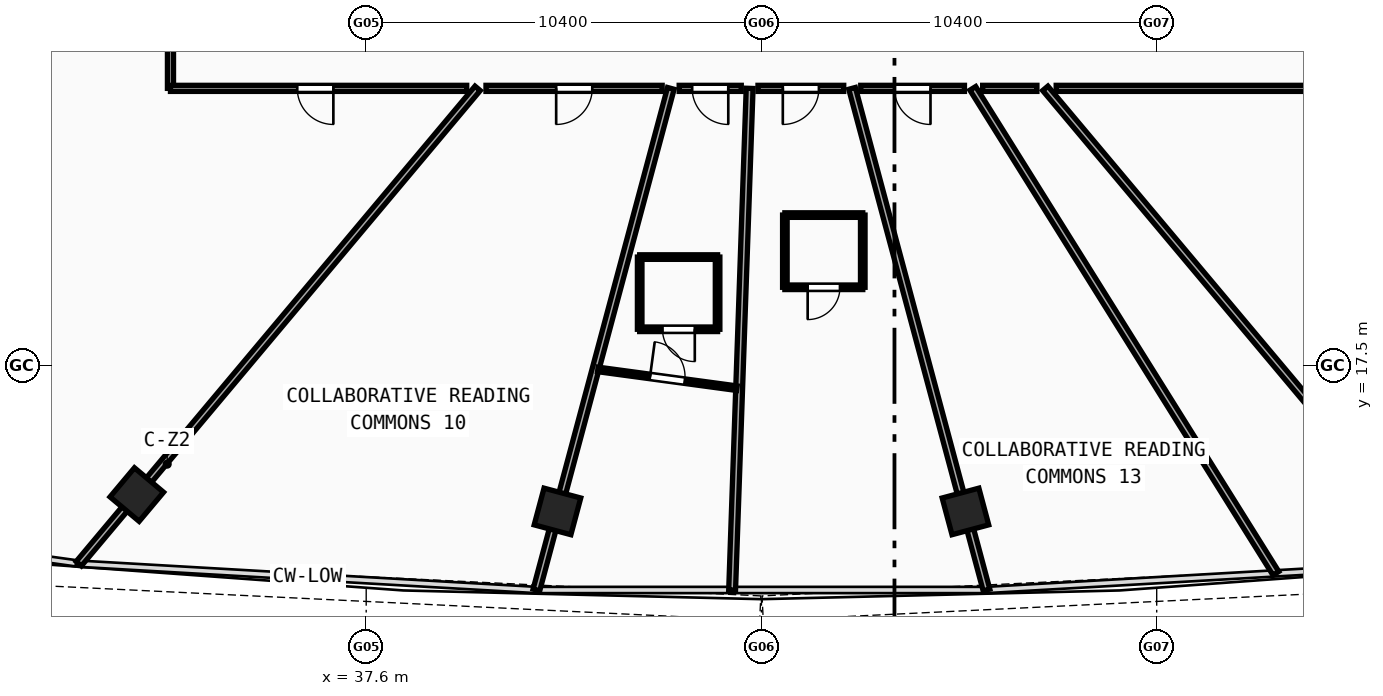
"""IFC4 building model, lengths in metres.
Left out: names, types, materials, properties, quantities, classifications, styles, units other than length and angle.
Written with IfcOpenShell. Run it as: python <this file> out.ifc"""

import sys

from ifc_helpers import new_model, si_unit, direction, frame, frame_2d, origin, origin_with_axes, origin_2d, place, context, subcontext, project, spatial, rectangle, hollow_rectangle, extrude, source, transform, mapped, element, fill, save


model = new_model("IFC4")
c1 = context("Model", 3, precision=1e-05, world=origin(), true_north=direction((0.0, 1.0)))
c2 = subcontext(c1, "Body", "Model", "MODEL_VIEW")
j1 = project(units=[si_unit("LENGTHUNIT", "METRE"), si_unit("PLANEANGLEUNIT", "RADIAN")], contexts=[c1])
p1 = place(None, origin())
s1 = spatial("IfcSite", under=j1, at=p1, CompositionType="ELEMENT")
p2 = place(p1, origin())
s2 = spatial("IfcBuilding", under=s1, at=p2, CompositionType="ELEMENT")
p3 = place(p2, frame((0.0, 0.0, 84.98)))
s3 = spatial("IfcBuildingStorey", under=s2, at=p3, CompositionType="ELEMENT", Elevation=84.98)
m1 = source(origin(), c2, "Body", "SweptSolid", [
    extrude(hollow_rectangle(XDim=1.0, YDim=1.0, WallThickness=0.042, at=origin_2d()), origin(), (0.0, 0.0, 1.0), 3.8),
])
for number, where, z_axis, x_axis in (
    (1, (31.564, 14.112, -0.26), (0.0, 0.0, 1.0), (0.766, -0.643, 0.0)),
    (2, (42.633, 13.668, -0.26), (0.0, 0.0, 1.0), (0.966, -0.259, 0.0)),
    (3, (53.367, 13.668, -0.26), (0.0, 0.0, 1.0), (0.966, 0.259, 0.0)),
):
    element("IfcColumn", number, at=place(p3, frame(where, z_axis=z_axis, x_axis=x_axis)), inside=s3, PredefinedType="COLUMN", context=c2, shape_type="MappedRepresentation", body=[
        mapped(m1, transform((0.0, 0.0, 0.0), scale=1.0)),
    ])
p4 = place(p3, frame((40.532, 24.8, 0.0), z_axis=(0.0, 0.0, 1.0), x_axis=(-0.642790086939, -0.76604236445, 0.0)))
e4 = element("IfcWall", 4, at=p4, inside=s3, PredefinedType="PARTITIONING", context=c2, shape_type="SweptSolid", body=[
    extrude(rectangle(XDim=16.326, YDim=0.18, at=frame_2d((8.163, 0.0))), origin(), (0.0, 0.0, 1.0), 2.84),
])
p5 = place(p3, frame((45.615, 24.8, 0.0), z_axis=(0.0, 0.0, 1.0), x_axis=(-0.25881675816, -0.965926439071, 0.0)))
e5 = element("IfcWall", 5, at=p5, inside=s3, PredefinedType="PARTITIONING", context=c2, shape_type="SweptSolid", body=[
    extrude(rectangle(XDim=13.665, YDim=0.18, at=frame_2d((6.832, 0.0))), origin(), (0.0, 0.0, 1.0), 2.84),
])
p6 = place(p3, frame((47.689, 24.8, 0.0), z_axis=(0.0, 0.0, 1.0), x_axis=(-0.034900944933, -0.999390776445, 0.0)))
e6 = element("IfcWall", 6, at=p6, inside=s3, PredefinedType="PARTITIONING", context=c2, shape_type="SweptSolid", body=[
    extrude(rectangle(XDim=13.207, YDim=0.18, at=frame_2d((6.604, 0.0))), origin(), (0.0, 0.0, 1.0), 2.84),
])
p7 = place(p3, frame((50.385, 24.8, 0.0), z_axis=(0.0, 0.0, 1.0), x_axis=(0.25881675816, -0.965926439071, 0.0)))
e7 = element("IfcWall", 7, at=p7, inside=s3, PredefinedType="PARTITIONING", context=c2, shape_type="SweptSolid", body=[
    extrude(rectangle(XDim=13.665, YDim=0.18, at=frame_2d((6.832, 0.0))), origin(), (0.0, 0.0, 1.0), 2.84),
])
p8 = place(p3, frame((53.561, 24.8, 0.0), z_axis=(0.0, 0.0, 1.0), x_axis=(0.529927477017, -0.848042964184, 0.0)))
e8 = element("IfcWall", 8, at=p8, inside=s3, PredefinedType="PARTITIONING", context=c2, shape_type="SweptSolid", body=[
    extrude(rectangle(XDim=15.048, YDim=0.18, at=frame_2d((7.524, 0.0))), origin(), (0.0, 0.0, 1.0), 2.84),
])
p9 = place(p3, frame((55.468, 24.8, 0.0), z_axis=(0.0, 0.0, 1.0), x_axis=(0.642790086939, -0.76604236445, 0.0)))
e9 = element("IfcWall", 9, at=p9, inside=s3, PredefinedType="PARTITIONING", context=c2, shape_type="SweptSolid", body=[
    extrude(rectangle(XDim=16.326, YDim=0.18, at=frame_2d((8.163, 0.0))), origin(), (0.0, 0.0, 1.0), 2.84),
])
p10 = place(p3, frame((32.45, 24.8, 0.0), z_axis=(0.0, 0.0, 1.0), x_axis=(0.0, 1.0, 0.0)))
e10 = element("IfcWall", 10, at=p10, inside=s3, PredefinedType="PARTITIONING", context=c2, shape_type="SweptSolid", body=[
    extrude(rectangle(XDim=5.935, YDim=0.16, at=frame_2d((2.967, 0.0))), origin(), (0.0, 0.0, 1.0), 3.14),
])
p11 = place(p3, frame((64.2, 24.8, 0.0), z_axis=(0.0, 0.0, 1.0), x_axis=(-1.0, 0.0, 0.0)))
e11 = element("IfcWall", 11, at=p11, inside=s3, PredefinedType="PARTITIONING", context=c2, shape_type="SweptSolid", body=[
    extrude(rectangle(XDim=8.445, YDim=0.16, at=frame_2d((4.222, 0.0))), origin(), (0.0, 0.0, 1.0), 3.14),
])
p12 = place(p3, frame((55.248, 24.8, 0.0), z_axis=(0.0, 0.0, 1.0), x_axis=(-1.0, 0.0, 0.0)))
e12 = element("IfcWall", 12, at=p12, inside=s3, PredefinedType="PARTITIONING", context=c2, shape_type="SweptSolid", body=[
    extrude(rectangle(XDim=1.427, YDim=0.16, at=frame_2d((0.714, 0.0))), origin(), (0.0, 0.0, 1.0), 2.84),
])
p13 = place(p3, frame((53.342, 24.8, 0.0), z_axis=(0.0, 0.0, 1.0), x_axis=(-1.0, 0.0, 0.0)))
e13 = element("IfcWall", 13, at=p13, inside=s3, PredefinedType="PARTITIONING", context=c2, shape_type="SweptSolid", body=[
    extrude(rectangle(XDim=2.729, YDim=0.16, at=frame_2d((1.365, 0.0))), origin(), (0.0, 0.0, 1.0), 3.54),
])
p14 = place(p13, frame((0.894, 0.0, 0.0)))
e14 = element("IfcOpeningElement", 14, at=p14, cuts=e13, PredefinedType="OPENING", context=c2, shape_type="SweptSolid", body=[
    extrude(rectangle(XDim=0.95, YDim=2.1, at=frame_2d((0.475, 1.05))), frame((0.0, 0.09, 0.0), z_axis=(0.0, -1.0, 0.0), x_axis=(1.0, 0.0, 0.0)), (0.0, 0.0, 1.0), 0.18),
])
p15 = place(p3, frame((50.165, 24.8, 0.0), z_axis=(0.0, 0.0, 1.0), x_axis=(-1.0, 0.0, 0.0)))
e15 = element("IfcWall", 15, at=p15, inside=s3, PredefinedType="PARTITIONING", context=c2, shape_type="SweptSolid", body=[
    extrude(rectangle(XDim=2.256, YDim=0.16, at=frame_2d((1.128, 0.0))), origin(), (0.0, 0.0, 1.0), 3.54),
])
p16 = place(p15, frame((0.653, 0.0, 0.0)))
e16 = element("IfcOpeningElement", 16, at=p16, cuts=e15, PredefinedType="OPENING", context=c2, shape_type="SweptSolid", body=[
    extrude(rectangle(XDim=0.95, YDim=2.1, at=frame_2d((0.475, 1.05))), frame((0.0, 0.09, 0.0), z_axis=(0.0, -1.0, 0.0), x_axis=(1.0, 0.0, 0.0)), (0.0, 0.0, 1.0), 0.18),
])
p17 = place(p3, frame((47.469, 24.8, 0.0), z_axis=(0.0, 0.0, 1.0), x_axis=(-1.0, 0.0, 0.0)))
e17 = element("IfcWall", 17, at=p17, inside=s3, PredefinedType="PARTITIONING", context=c2, shape_type="SweptSolid", body=[
    extrude(rectangle(XDim=1.634, YDim=0.16, at=frame_2d((0.817, 0.0))), origin(), (0.0, 0.0, 1.0), 3.54),
])
p18 = place(p17, frame((0.342, 0.0, 0.0)))
e18 = element("IfcOpeningElement", 18, at=p18, cuts=e17, PredefinedType="OPENING", context=c2, shape_type="SweptSolid", body=[
    extrude(rectangle(XDim=0.95, YDim=2.1, at=frame_2d((0.475, 1.05))), frame((0.0, 0.09, 0.0), z_axis=(0.0, -1.0, 0.0), x_axis=(1.0, 0.0, 0.0)), (0.0, 0.0, 1.0), 0.18),
])
p19 = place(p3, frame((45.387, 24.8, 0.0), z_axis=(0.0, 0.0, 1.0), x_axis=(-1.0, 0.0, 0.0)))
e19 = element("IfcWall", 19, at=p19, inside=s3, PredefinedType="PARTITIONING", context=c2, shape_type="SweptSolid", body=[
    extrude(rectangle(XDim=4.635, YDim=0.16, at=frame_2d((2.318, 0.0))), origin(), (0.0, 0.0, 1.0), 2.84),
])
p20 = place(p19, frame((1.839, 0.0, 0.0)))
e20 = element("IfcOpeningElement", 20, at=p20, cuts=e19, PredefinedType="OPENING", context=c2, shape_type="SweptSolid", body=[
    extrude(rectangle(XDim=0.95, YDim=2.1, at=frame_2d((0.475, 1.05))), frame((0.0, 0.09, 0.0), z_axis=(0.0, -1.0, 0.0), x_axis=(1.0, 0.0, 0.0)), (0.0, 0.0, 1.0), 0.18),
])
p21 = place(p3, frame((40.245, 24.8, 0.0), z_axis=(0.0, 0.0, 1.0), x_axis=(-1.0, 0.0, 0.0)))
e21 = element("IfcWall", 21, at=p21, inside=s3, PredefinedType="PARTITIONING", context=c2, shape_type="SweptSolid", body=[
    extrude(rectangle(XDim=7.795, YDim=0.16, at=frame_2d((3.897, 0.0))), origin(), (0.0, 0.0, 1.0), 3.14),
])
p22 = place(p21, frame((3.509, 0.0, 0.0)))
e22 = element("IfcOpeningElement", 22, at=p22, cuts=e21, PredefinedType="OPENING", context=c2, shape_type="SweptSolid", body=[
    extrude(rectangle(XDim=0.95, YDim=2.1, at=frame_2d((0.475, 1.05))), frame((0.0, 0.09, 0.0), z_axis=(0.0, -1.0, 0.0), x_axis=(1.0, 0.0, 0.0)), (0.0, 0.0, 1.0), 0.18),
])
p23 = place(p3, frame((44.796, 18.461, 0.0), z_axis=(0.0, 0.0, 1.0), x_axis=(1.0, 0.0, 0.0)))
e23 = element("IfcWall", 23, at=p23, inside=s3, PredefinedType="PARTITIONING", context=c2, shape_type="SweptSolid", body=[
    extrude(rectangle(XDim=2.05, YDim=0.12, at=frame_2d((1.025, 0.0))), origin(), (0.0, 0.0, 1.0), 3.54),
])
p24 = place(p23, frame((0.6, 0.0, 0.0)))
e24 = element("IfcOpeningElement", 24, at=p24, cuts=e23, PredefinedType="OPENING", context=c2, shape_type="SweptSolid", body=[
    extrude(rectangle(XDim=0.85, YDim=2.1, at=frame_2d((0.425, 1.05))), frame((0.0, 0.07, 0.0), z_axis=(0.0, -1.0, 0.0), x_axis=(1.0, 0.0, 0.0)), (0.0, 0.0, 1.0), 0.14),
])
p25 = place(p3, frame((46.846, 18.461, 0.0), z_axis=(0.0, 0.0, 1.0), x_axis=(0.0, 1.0, 0.0)))
e25 = element("IfcWall", 25, at=p25, inside=s3, PredefinedType="PARTITIONING", context=c2, shape_type="SweptSolid", body=[
    extrude(rectangle(XDim=1.9, YDim=0.12, at=frame_2d((0.95, 0.0))), origin(), (0.0, 0.0, 1.0), 3.54),
])
p26 = place(p3, frame((46.846, 20.361, 0.0), z_axis=(0.0, 0.0, 1.0), x_axis=(-1.0, 0.0, 0.0)))
e26 = element("IfcWall", 26, at=p26, inside=s3, PredefinedType="PARTITIONING", context=c2, shape_type="SweptSolid", body=[
    extrude(rectangle(XDim=2.05, YDim=0.12, at=frame_2d((1.025, 0.0))), origin(), (0.0, 0.0, 1.0), 3.54),
])
p27 = place(p3, frame((44.796, 20.361, 0.0), z_axis=(0.0, 0.0, 1.0), x_axis=(0.0, -1.0, 0.0)))
e27 = element("IfcWall", 27, at=p27, inside=s3, PredefinedType="PARTITIONING", context=c2, shape_type="SweptSolid", body=[
    extrude(rectangle(XDim=1.9, YDim=0.12, at=frame_2d((0.95, 0.0))), origin(), (0.0, 0.0, 1.0), 3.54),
])
p28 = place(p3, frame((43.696, 17.405, 0.0), z_axis=(0.0, 0.0, 1.0), x_axis=(0.99099005791, -0.133935451329, 0.0)))
e28 = element("IfcWall", 28, at=p28, inside=s3, PredefinedType="PARTITIONING", context=c2, shape_type="SweptSolid", body=[
    extrude(rectangle(XDim=3.691, YDim=0.12, at=frame_2d((1.846, 0.0))), origin(), (0.0, 0.0, 1.0), 2.84),
])
p29 = place(p28, frame((1.385, 0.0, 0.0)))
e29 = element("IfcOpeningElement", 29, at=p29, cuts=e28, PredefinedType="OPENING", context=c2, shape_type="SweptSolid", body=[
    extrude(rectangle(XDim=0.92, YDim=2.1, at=frame_2d((0.46, 1.05))), frame((0.0, 0.07, 0.0), z_axis=(0.0, -1.0, 0.0), x_axis=(1.0, 0.0, 0.0)), (0.0, 0.0, 1.0), 0.14),
])
p30 = place(p3, frame((48.616, 19.566, 0.0), z_axis=(0.0, 0.0, 1.0), x_axis=(1.0, 0.0, 0.0)))
e30 = element("IfcWall", 30, at=p30, inside=s3, PredefinedType="PARTITIONING", context=c2, shape_type="SweptSolid", body=[
    extrude(rectangle(XDim=2.05, YDim=0.12, at=frame_2d((1.025, 0.0))), origin(), (0.0, 0.0, 1.0), 3.54),
])
p31 = place(p30, frame((0.6, 0.0, 0.0)))
e31 = element("IfcOpeningElement", 31, at=p31, cuts=e30, PredefinedType="OPENING", context=c2, shape_type="SweptSolid", body=[
    extrude(rectangle(XDim=0.85, YDim=2.1, at=frame_2d((0.425, 1.05))), frame((0.0, 0.07, 0.0), z_axis=(0.0, -1.0, 0.0), x_axis=(1.0, 0.0, 0.0)), (0.0, 0.0, 1.0), 0.14),
])
p32 = place(p3, frame((50.666, 19.566, 0.0), z_axis=(0.0, 0.0, 1.0), x_axis=(0.0, 1.0, 0.0)))
e32 = element("IfcWall", 32, at=p32, inside=s3, PredefinedType="PARTITIONING", context=c2, shape_type="SweptSolid", body=[
    extrude(rectangle(XDim=1.9, YDim=0.12, at=frame_2d((0.95, 0.0))), origin(), (0.0, 0.0, 1.0), 3.54),
])
p33 = place(p3, frame((50.666, 21.466, 0.0), z_axis=(0.0, 0.0, 1.0), x_axis=(-1.0, 0.0, 0.0)))
e33 = element("IfcWall", 33, at=p33, inside=s3, PredefinedType="PARTITIONING", context=c2, shape_type="SweptSolid", body=[
    extrude(rectangle(XDim=2.05, YDim=0.12, at=frame_2d((1.025, 0.0))), origin(), (0.0, 0.0, 1.0), 3.54),
])
p34 = place(p3, frame((48.616, 21.466, 0.0), z_axis=(0.0, 0.0, 1.0), x_axis=(0.0, -1.0, 0.0)))
e34 = element("IfcWall", 34, at=p34, inside=s3, PredefinedType="PARTITIONING", context=c2, shape_type="SweptSolid", body=[
    extrude(rectangle(XDim=1.9, YDim=0.12, at=frame_2d((0.95, 0.0))), origin(), (0.0, 0.0, 1.0), 3.54),
])
m2 = source(origin(), c2, "Body", "SweptSolid", [
    extrude(rectangle(XDim=0.95, YDim=2.1, at=frame_2d((0.475, 1.05))), frame((0.0, 0.025, 0.0), z_axis=(0.0, -1.0, 0.0), x_axis=(1.0, 0.0, 0.0)), (0.0, 0.0, 1.0), 0.05),
])
p35 = place(p22, origin_with_axes())
e35 = element("IfcDoor", 35, at=p35, inside=s3, OperationType="SINGLE_SWING_LEFT", PredefinedType="DOOR", context=c2, shape_type="MappedRepresentation", body=[
    mapped(m2, transform((0.0, 0.0, 0.0), scale=1.0)),
])
fill(e22, e35)
p36 = place(p20, origin_with_axes())
e36 = element("IfcDoor", 36, at=p36, inside=s3, OperationType="SINGLE_SWING_RIGHT", PredefinedType="DOOR", context=c2, shape_type="MappedRepresentation", body=[
    mapped(m2, transform((0.0, 0.0, 0.0), scale=1.0)),
])
fill(e20, e36)
p37 = place(p18, origin_with_axes())
e37 = element("IfcDoor", 37, at=p37, inside=s3, OperationType="SINGLE_SWING_LEFT", PredefinedType="DOOR", context=c2, shape_type="MappedRepresentation", body=[
    mapped(m2, transform((0.0, 0.0, 0.0), scale=1.0)),
])
fill(e18, e37)
m3 = source(origin(), c2, "Body", "SweptSolid", [
    extrude(rectangle(XDim=0.85, YDim=2.1, at=frame_2d((0.425, 1.05))), frame((0.0, 0.025, 0.0), z_axis=(0.0, -1.0, 0.0), x_axis=(1.0, 0.0, 0.0)), (0.0, 0.0, 1.0), 0.05),
])
p38 = place(p24, frame((0.85, 0.0, 0.0), z_axis=(0.0, 0.0, 1.0), x_axis=(-1.0, 0.0, 0.0)))
e38 = element("IfcDoor", 38, at=p38, inside=s3, OperationType="SINGLE_SWING_LEFT", PredefinedType="DOOR", context=c2, shape_type="MappedRepresentation", body=[
    mapped(m3, transform((0.0, 0.0, 0.0), scale=1.0)),
])
fill(e24, e38)
m4 = source(origin(), c2, "Body", "SweptSolid", [
    extrude(rectangle(XDim=0.92, YDim=2.1, at=frame_2d((0.46, 1.05))), frame((0.0, 0.025, 0.0), z_axis=(0.0, -1.0, 0.0), x_axis=(1.0, 0.0, 0.0)), (0.0, 0.0, 1.0), 0.05),
])
p39 = place(p29, origin_with_axes())
e39 = element("IfcDoor", 39, at=p39, inside=s3, OperationType="SINGLE_SWING_LEFT", PredefinedType="DOOR", context=c2, shape_type="MappedRepresentation", body=[
    mapped(m4, transform((0.0, 0.0, 0.0), scale=1.0)),
])
fill(e29, e39)
p40 = place(p16, origin_with_axes())
e40 = element("IfcDoor", 40, at=p40, inside=s3, OperationType="SINGLE_SWING_RIGHT", PredefinedType="DOOR", context=c2, shape_type="MappedRepresentation", body=[
    mapped(m2, transform((0.0, 0.0, 0.0), scale=1.0)),
])
fill(e16, e40)
p41 = place(p31, frame((0.85, 0.0, 0.0), z_axis=(0.0, 0.0, 1.0), x_axis=(-1.0, 0.0, 0.0)))
e41 = element("IfcDoor", 41, at=p41, inside=s3, OperationType="SINGLE_SWING_RIGHT", PredefinedType="DOOR", context=c2, shape_type="MappedRepresentation", body=[
    mapped(m3, transform((0.0, 0.0, 0.0), scale=1.0)),
])
fill(e31, e41)
p42 = place(p14, origin_with_axes())
e42 = element("IfcDoor", 42, at=p42, inside=s3, OperationType="SINGLE_SWING_LEFT", PredefinedType="DOOR", context=c2, shape_type="MappedRepresentation", body=[
    mapped(m2, transform((0.0, 0.0, 0.0), scale=1.0)),
])
fill(e14, e42)
save(model, sys.argv[1])
